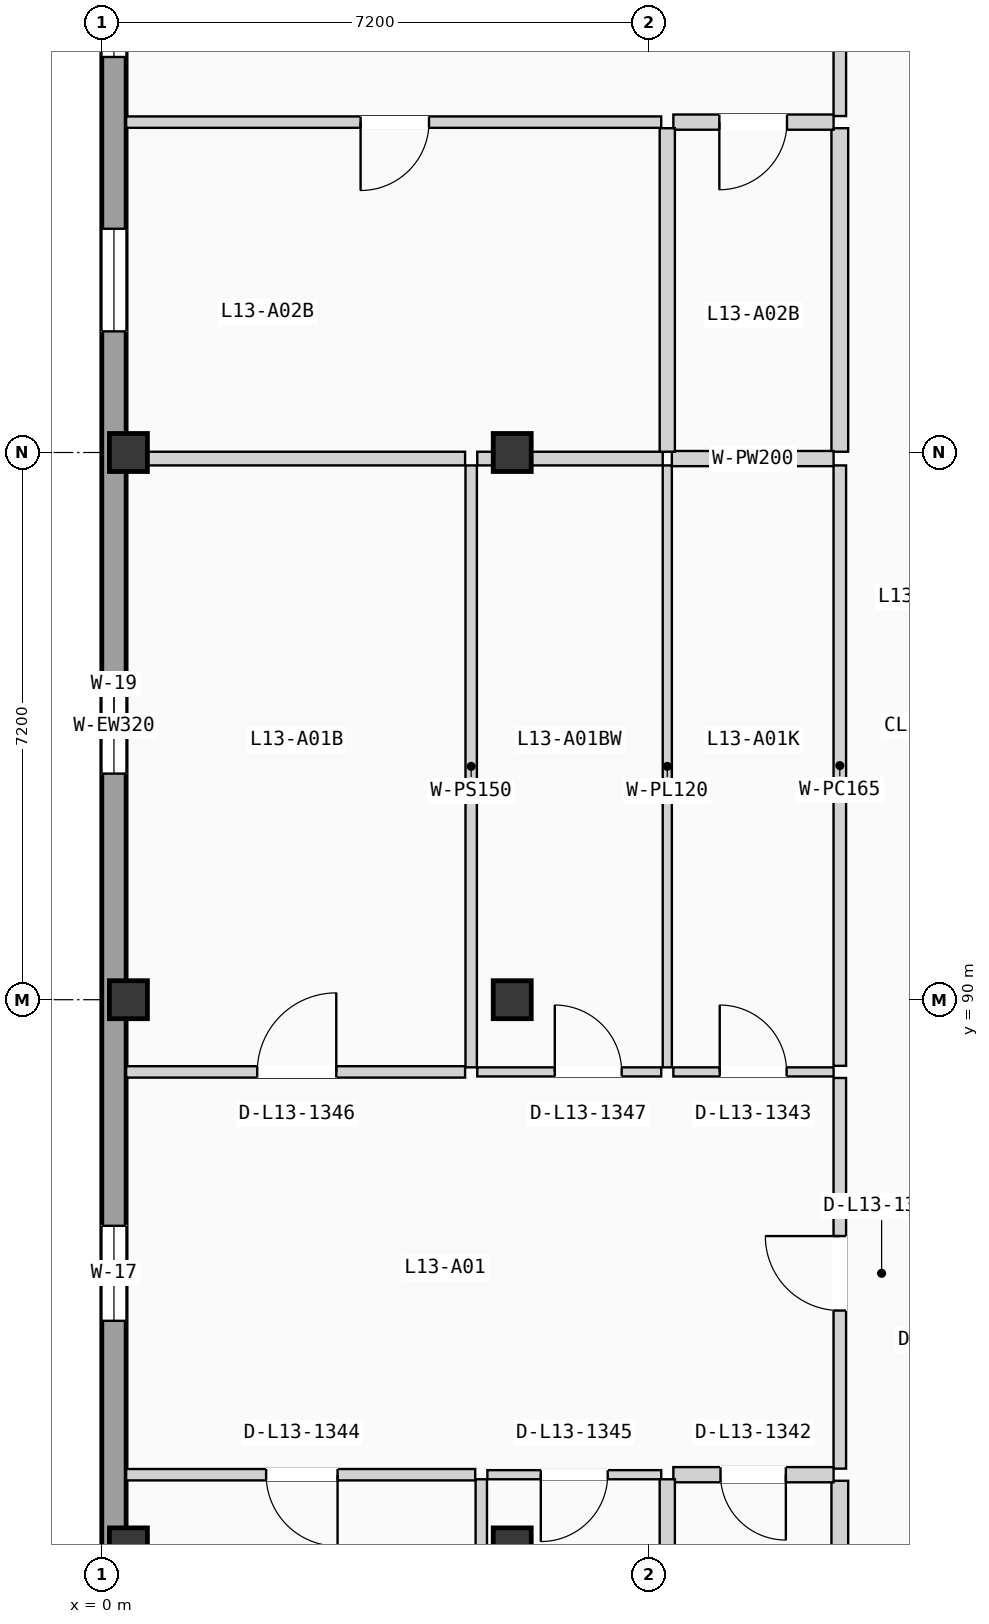
"""IFC4 building model, lengths in metres.
Left out: names, types, materials, properties, quantities, classifications, styles, units other than length and angle.
Written with IfcOpenShell. Run it as: python <this file> out.ifc"""

import sys

from ifc_helpers import new_model, si_unit, direction, frame, frame_2d, origin, origin_2d, place, context, subcontext, project, spatial, rectangle, extrude, element, fill, save


model = new_model("IFC4")
c1 = context("Model", 3, precision=1e-05, world=origin(), true_north=direction((0.0, 1.0)))
c2 = subcontext(c1, "Body", "Model", "MODEL_VIEW")
j1 = project(units=[si_unit("LENGTHUNIT", "METRE"), si_unit("PLANEANGLEUNIT", "RADIAN")], contexts=[c1])
p1 = place(None, origin())
s1 = spatial("IfcSite", under=j1, at=p1, CompositionType="ELEMENT")
p2 = place(p1, origin())
s2 = spatial("IfcBuilding", under=s1, at=p2, CompositionType="ELEMENT")
p3 = place(p2, frame((0.0, 0.0, 43.575)))
s3 = spatial("IfcBuildingStorey", under=s2, at=p3, CompositionType="ELEMENT", Elevation=43.575)
for number, where, z_axis, x_axis in (
    (1, (0.35, 82.8, 0.0), (0.0, 0.0, 1.0), (1.0, 0.0, 0.0)),
    (2, (0.35, 90.0, 0.0), (0.0, 0.0, 1.0), (1.0, 0.0, 0.0)),
    (3, (0.35, 97.2, 0.0), (0.0, 0.0, 1.0), (1.0, 0.0, 0.0)),
    (4, (5.4, 82.8, 0.0), (0.0, 0.0, 1.0), (1.0, 0.0, 0.0)),
    (5, (5.4, 90.0, 0.0), (0.0, 0.0, 1.0), (1.0, 0.0, 0.0)),
    (6, (5.4, 97.2, 0.0), (0.0, 0.0, 1.0), (1.0, 0.0, 0.0)),
):
    element("IfcColumn", number, at=place(p3, frame(where, z_axis=z_axis, x_axis=x_axis)), inside=s3, PredefinedType="COLUMN", context=c2, shape_type="SweptSolid", body=[
        extrude(rectangle(XDim=0.5, YDim=0.5, at=origin_2d()), origin(), (0.0, 0.0, 1.0), 3.15),
    ])
p4 = place(p3, frame((0.16, 68.72, 0.0), z_axis=(0.0, 0.0, 1.0), x_axis=(0.0, 1.0, 0.0)))
e7 = element("IfcWall", 7, at=p4, inside=s3, PredefinedType="SOLIDWALL", context=c2, shape_type="SweptSolid", body=[
    extrude(rectangle(XDim=49.76, YDim=0.32, at=frame_2d((24.88, 0.0))), origin(), (0.0, 0.0, 1.0), 2.6),
])
p5 = place(p4, frame((17.055, 0.0, 0.815)))
e8 = element("IfcOpeningElement", 8, at=p5, cuts=e7, PredefinedType="OPENING", context=c2, shape_type="SweptSolid", body=[
    extrude(rectangle(XDim=1.25, YDim=1.35, at=frame_2d((0.625, 0.675))), frame((0.0, 0.17, 0.0), z_axis=(0.0, -1.0, 0.0), x_axis=(1.0, 0.0, 0.0)), (0.0, 0.0, 1.0), 0.34),
])
p6 = place(p4, frame((9.92, 0.0, 0.665)))
e9 = element("IfcOpeningElement", 9, at=p6, cuts=e7, PredefinedType="OPENING", context=c2, shape_type="SweptSolid", body=[
    extrude(rectangle(XDim=1.25, YDim=1.5, at=frame_2d((0.625, 0.75))), frame((0.0, 0.17, 0.0), z_axis=(0.0, -1.0, 0.0), x_axis=(1.0, 0.0, 0.0)), (0.0, 0.0, 1.0), 0.34),
])
p7 = place(p4, frame((24.255, 0.0, 0.515)))
e10 = element("IfcOpeningElement", 10, at=p7, cuts=e7, PredefinedType="OPENING", context=c2, shape_type="SweptSolid", body=[
    extrude(rectangle(XDim=1.25, YDim=1.65, at=frame_2d((0.625, 0.825))), frame((0.0, 0.17, 0.0), z_axis=(0.0, -1.0, 0.0), x_axis=(1.0, 0.0, 0.0)), (0.0, 0.0, 1.0), 0.34),
])
p8 = place(p4, frame((33.684, 0.0, 0.85)))
e11 = element("IfcOpeningElement", 11, at=p8, cuts=e7, PredefinedType="OPENING", context=c2, shape_type="SweptSolid", body=[
    extrude(rectangle(XDim=0.95, YDim=1.2, at=frame_2d((0.475, 0.6))), frame((0.0, 0.17, 0.0), z_axis=(0.0, -1.0, 0.0), x_axis=(1.0, 0.0, 0.0)), (0.0, 0.0, 1.0), 0.34),
])
p9 = place(p4, frame((30.074, 0.0, 0.9)))
e12 = element("IfcOpeningElement", 12, at=p9, cuts=e7, PredefinedType="OPENING", context=c2, shape_type="SweptSolid", body=[
    extrude(rectangle(XDim=1.35, YDim=1.2, at=frame_2d((0.675, 0.6))), frame((0.0, 0.17, 0.0), z_axis=(0.0, -1.0, 0.0), x_axis=(1.0, 0.0, 0.0)), (0.0, 0.0, 1.0), 0.34),
])
p10 = place(p4, frame((39.677, 0.0, 0.815)))
e13 = element("IfcOpeningElement", 13, at=p10, cuts=e7, PredefinedType="OPENING", context=c2, shape_type="SweptSolid", body=[
    extrude(rectangle(XDim=1.35, YDim=1.35, at=frame_2d((0.675, 0.675))), frame((0.0, 0.17, 0.0), z_axis=(0.0, -1.0, 0.0), x_axis=(1.0, 0.0, 0.0)), (0.0, 0.0, 1.0), 0.34),
])
p11 = place(p3, frame((9.71, 83.83, 0.0), z_axis=(0.0, 0.0, 1.0), x_axis=(0.0, 1.0, 0.0)))
e14 = element("IfcWall", 14, at=p11, inside=s3, PredefinedType="PARTITIONING", context=c2, shape_type="SweptSolid", body=[
    extrude(rectangle(XDim=5.14, YDim=0.165, at=frame_2d((2.57, 0.0))), origin(), (0.0, 0.0, 1.0), 2.87),
])
p12 = place(p11, frame((2.08, 0.0, 0.0)))
e15 = element("IfcOpeningElement", 15, at=p12, cuts=e14, PredefinedType="OPENING", context=c2, shape_type="SweptSolid", body=[
    extrude(rectangle(XDim=0.98, YDim=2.08, at=frame_2d((0.49, 1.04))), frame((0.0, 0.093, 0.0), z_axis=(0.0, -1.0, 0.0), x_axis=(1.0, 0.0, 0.0)), (0.0, 0.0, 1.0), 0.185),
])
p13 = place(p3, frame((9.71, 76.0, 0.0), z_axis=(0.0, 0.0, 1.0), x_axis=(0.0, 1.0, 0.0)))
e16 = element("IfcWall", 16, at=p13, inside=s3, PredefinedType="PLUMBINGWALL", context=c2, shape_type="SweptSolid", body=[
    extrude(rectangle(XDim=7.67, YDim=0.22, at=frame_2d((3.835, 0.0))), origin(), (0.0, 0.0, 1.0), 2.87),
])
p14 = place(p3, frame((9.71, 89.13, 0.0), z_axis=(0.0, 0.0, 1.0), x_axis=(0.0, 1.0, 0.0)))
e17 = element("IfcWall", 17, at=p14, inside=s3, PredefinedType="PARTITIONING", context=c2, shape_type="SweptSolid", body=[
    extrude(rectangle(XDim=7.9, YDim=0.165, at=frame_2d((3.95, 0.0))), origin(), (0.0, 0.0, 1.0), 2.87),
])
p15 = place(p3, frame((9.71, 101.627, 0.0), z_axis=(0.0, 0.0, 1.0), x_axis=(0.0, 1.0, 0.0)))
e18 = element("IfcWall", 18, at=p15, inside=s3, PredefinedType="PARTITIONING", context=c2, shape_type="SweptSolid", body=[
    extrude(rectangle(XDim=5.156, YDim=0.165, at=frame_2d((2.578, 0.0))), origin(), (0.0, 0.0, 1.0), 2.87),
])
p16 = place(p15, frame((2.088, 0.0, 0.0)))
e19 = element("IfcOpeningElement", 19, at=p16, cuts=e18, PredefinedType="OPENING", context=c2, shape_type="SweptSolid", body=[
    extrude(rectangle(XDim=0.98, YDim=2.08, at=frame_2d((0.49, 1.04))), frame((0.0, 0.093, 0.0), z_axis=(0.0, -1.0, 0.0), x_axis=(1.0, 0.0, 0.0)), (0.0, 0.0, 1.0), 0.185),
])
p17 = place(p3, frame((9.71, 97.21, 0.0), z_axis=(0.0, 0.0, 1.0), x_axis=(0.0, 1.0, 0.0)))
e20 = element("IfcWall", 20, at=p17, inside=s3, PredefinedType="PLUMBINGWALL", context=c2, shape_type="SweptSolid", body=[
    extrude(rectangle(XDim=4.257, YDim=0.22, at=frame_2d((2.128, 0.0))), origin(), (0.0, 0.0, 1.0), 2.87),
])
p18 = place(p3, frame((7.52, 83.75, 0.0), z_axis=(0.0, 0.0, 1.0), x_axis=(1.0, 0.0, 0.0)))
e21 = element("IfcWall", 21, at=p18, inside=s3, PredefinedType="PLUMBINGWALL", context=c2, shape_type="SweptSolid", body=[
    extrude(rectangle(XDim=2.108, YDim=0.2, at=frame_2d((1.054, 0.0))), origin(), (0.0, 0.0, 1.0), 2.87),
])
p19 = place(p18, frame((0.62, 0.0, 0.0)))
e22 = element("IfcOpeningElement", 22, at=p19, cuts=e21, PredefinedType="OPENING", context=c2, shape_type="SweptSolid", body=[
    extrude(rectangle(XDim=0.86, YDim=2.0, at=frame_2d((0.43, 1.0))), frame((0.0, 0.11, 0.0), z_axis=(0.0, -1.0, 0.0), x_axis=(1.0, 0.0, 0.0)), (0.0, 0.0, 1.0), 0.22),
])
p20 = place(p3, frame((7.52, 89.05, 0.0), z_axis=(0.0, 0.0, 1.0), x_axis=(1.0, 0.0, 0.0)))
e23 = element("IfcWall", 23, at=p20, inside=s3, PredefinedType="PARTITIONING", context=c2, shape_type="SweptSolid", body=[
    extrude(rectangle(XDim=2.108, YDim=0.12, at=frame_2d((1.054, 0.0))), origin(), (0.0, 0.0, 1.0), 2.87),
])
p21 = place(p20, frame((0.61, 0.0, 0.0)))
e24 = element("IfcOpeningElement", 24, at=p21, cuts=e23, PredefinedType="OPENING", context=c2, shape_type="SweptSolid", body=[
    extrude(rectangle(XDim=0.88, YDim=2.02, at=frame_2d((0.44, 1.01))), frame((0.0, 0.07, 0.0), z_axis=(0.0, -1.0, 0.0), x_axis=(1.0, 0.0, 0.0)), (0.0, 0.0, 1.0), 0.14),
])
p22 = place(p3, frame((0.32, 83.75, 0.0), z_axis=(0.0, 0.0, 1.0), x_axis=(1.0, 0.0, 0.0)))
e25 = element("IfcWall", 25, at=p22, inside=s3, PredefinedType="PARTITIONING", context=c2, shape_type="SweptSolid", body=[
    extrude(rectangle(XDim=4.593, YDim=0.15, at=frame_2d((2.296, 0.0))), origin(), (0.0, 0.0, 1.0), 2.87),
])
p23 = place(p22, frame((1.842, 0.0, 0.0)))
e26 = element("IfcOpeningElement", 26, at=p23, cuts=e25, PredefinedType="OPENING", context=c2, shape_type="SweptSolid", body=[
    extrude(rectangle(XDim=0.94, YDim=2.06, at=frame_2d((0.47, 1.03))), frame((0.0, 0.085, 0.0), z_axis=(0.0, -1.0, 0.0), x_axis=(1.0, 0.0, 0.0)), (0.0, 0.0, 1.0), 0.17),
])
p24 = place(p3, frame((5.073, 83.75, 0.0), z_axis=(0.0, 0.0, 1.0), x_axis=(1.0, 0.0, 0.0)))
e27 = element("IfcWall", 27, at=p24, inside=s3, PredefinedType="PARTITIONING", context=c2, shape_type="SweptSolid", body=[
    extrude(rectangle(XDim=2.287, YDim=0.12, at=frame_2d((1.144, 0.0))), origin(), (0.0, 0.0, 1.0), 2.87),
])
p25 = place(p24, frame((0.703, 0.0, 0.0)))
e28 = element("IfcOpeningElement", 28, at=p25, cuts=e27, PredefinedType="OPENING", context=c2, shape_type="SweptSolid", body=[
    extrude(rectangle(XDim=0.88, YDim=2.02, at=frame_2d((0.44, 1.01))), frame((0.0, 0.07, 0.0), z_axis=(0.0, -1.0, 0.0), x_axis=(1.0, 0.0, 0.0)), (0.0, 0.0, 1.0), 0.14),
])
p26 = place(p3, frame((0.32, 89.05, 0.0), z_axis=(0.0, 0.0, 1.0), x_axis=(1.0, 0.0, 0.0)))
e29 = element("IfcWall", 29, at=p26, inside=s3, PredefinedType="PARTITIONING", context=c2, shape_type="SweptSolid", body=[
    extrude(rectangle(XDim=4.46, YDim=0.15, at=frame_2d((2.23, 0.0))), origin(), (0.0, 0.0, 1.0), 2.87),
])
p27 = place(p26, frame((1.725, 0.0, 0.0)))
e30 = element("IfcOpeningElement", 30, at=p27, cuts=e29, PredefinedType="OPENING", context=c2, shape_type="SweptSolid", body=[
    extrude(rectangle(XDim=1.04, YDim=2.08, at=frame_2d((0.52, 1.04))), frame((0.0, 0.085, 0.0), z_axis=(0.0, -1.0, 0.0), x_axis=(1.0, 0.0, 0.0)), (0.0, 0.0, 1.0), 0.17),
])
p28 = place(p3, frame((4.94, 89.05, 0.0), z_axis=(0.0, 0.0, 1.0), x_axis=(1.0, 0.0, 0.0)))
e31 = element("IfcWall", 31, at=p28, inside=s3, PredefinedType="PARTITIONING", context=c2, shape_type="SweptSolid", body=[
    extrude(rectangle(XDim=2.42, YDim=0.12, at=frame_2d((1.21, 0.0))), origin(), (0.0, 0.0, 1.0), 2.87),
])
p29 = place(p28, frame((1.02, 0.0, 0.0)))
e32 = element("IfcOpeningElement", 32, at=p29, cuts=e31, PredefinedType="OPENING", context=c2, shape_type="SweptSolid", body=[
    extrude(rectangle(XDim=0.88, YDim=2.02, at=frame_2d((0.44, 1.01))), frame((0.0, 0.07, 0.0), z_axis=(0.0, -1.0, 0.0), x_axis=(1.0, 0.0, 0.0)), (0.0, 0.0, 1.0), 0.14),
])
p30 = place(p3, frame((7.44, 76.0, 0.0), z_axis=(0.0, 0.0, 1.0), x_axis=(0.0, 1.0, 0.0)))
e33 = element("IfcWall", 33, at=p30, inside=s3, PredefinedType="PLUMBINGWALL", context=c2, shape_type="SweptSolid", body=[
    extrude(rectangle(XDim=7.69, YDim=0.2, at=frame_2d((3.845, 0.0))), origin(), (0.0, 0.0, 1.0), 2.87),
])
p31 = place(p30, frame((3.41, 0.0, 0.0)))
e34 = element("IfcOpeningElement", 34, at=p31, cuts=e33, PredefinedType="OPENING", context=c2, shape_type="SweptSolid", body=[
    extrude(rectangle(XDim=0.85, YDim=2.01, at=frame_2d((0.425, 1.005))), frame((0.0, 0.11, 0.0), z_axis=(0.0, -1.0, 0.0), x_axis=(1.0, 0.0, 0.0)), (0.0, 0.0, 1.0), 0.22),
])
p32 = place(p3, frame((7.44, 89.11, 0.0), z_axis=(0.0, 0.0, 1.0), x_axis=(0.0, 1.0, 0.0)))
e35 = element("IfcWall", 35, at=p32, inside=s3, PredefinedType="PARTITIONING", context=c2, shape_type="SweptSolid", body=[
    extrude(rectangle(XDim=7.92, YDim=0.12, at=frame_2d((3.96, 0.0))), origin(), (0.0, 0.0, 1.0), 2.87),
])
p33 = place(p3, frame((7.5, 97.12, 0.0), z_axis=(0.0, 0.0, 1.0), x_axis=(1.0, 0.0, 0.0)))
e36 = element("IfcWall", 36, at=p33, inside=s3, PredefinedType="PLUMBINGWALL", context=c2, shape_type="SweptSolid", body=[
    extrude(rectangle(XDim=2.128, YDim=0.2, at=frame_2d((1.064, 0.0))), origin(), (0.0, 0.0, 1.0), 2.17),
])
p34 = place(p3, frame((4.993, 76.0, 0.0), z_axis=(0.0, 0.0, 1.0), x_axis=(0.0, 1.0, 0.0)))
e37 = element("IfcWall", 37, at=p34, inside=s3, PredefinedType="PARTITIONING", context=c2, shape_type="SweptSolid", body=[
    extrude(rectangle(XDim=7.69, YDim=0.15, at=frame_2d((3.845, 0.0))), origin(), (0.0, 0.0, 1.0), 2.87),
])
p35 = place(p3, frame((4.86, 89.11, 0.0), z_axis=(0.0, 0.0, 1.0), x_axis=(0.0, 1.0, 0.0)))
e38 = element("IfcWall", 38, at=p35, inside=s3, PredefinedType="PARTITIONING", context=c2, shape_type="SweptSolid", body=[
    extrude(rectangle(XDim=7.92, YDim=0.15, at=frame_2d((3.96, 0.0))), origin(), (0.0, 0.0, 1.0), 2.87),
])
p36 = place(p3, frame((0.32, 97.12, 0.0), z_axis=(0.0, 0.0, 1.0), x_axis=(1.0, 0.0, 0.0)))
e39 = element("IfcWall", 39, at=p36, inside=s3, PredefinedType="PARTITIONING", context=c2, shape_type="SweptSolid", body=[
    extrude(rectangle(XDim=4.46, YDim=0.18, at=frame_2d((2.23, 0.0))), origin(), (0.0, 0.0, 1.0), 2.22),
])
p37 = place(p3, frame((4.94, 97.12, 0.0), z_axis=(0.0, 0.0, 1.0), x_axis=(1.0, 0.0, 0.0)))
e40 = element("IfcWall", 40, at=p37, inside=s3, PredefinedType="PARTITIONING", context=c2, shape_type="SweptSolid", body=[
    extrude(rectangle(XDim=2.44, YDim=0.18, at=frame_2d((1.22, 0.0))), origin(), (0.0, 0.0, 1.0), 2.17),
])
p38 = place(p3, frame((7.52, 101.547, 0.0), z_axis=(0.0, 0.0, 1.0), x_axis=(1.0, 0.0, 0.0)))
e41 = element("IfcWall", 41, at=p38, inside=s3, PredefinedType="PLUMBINGWALL", context=c2, shape_type="SweptSolid", body=[
    extrude(rectangle(XDim=2.108, YDim=0.2, at=frame_2d((1.054, 0.0))), origin(), (0.0, 0.0, 1.0), 2.87),
])
p39 = place(p38, frame((0.605, 0.0, 0.0)))
e42 = element("IfcOpeningElement", 42, at=p39, cuts=e41, PredefinedType="OPENING", context=c2, shape_type="SweptSolid", body=[
    extrude(rectangle(XDim=0.89, YDim=2.03, at=frame_2d((0.445, 1.015))), frame((0.0, 0.11, 0.0), z_axis=(0.0, -1.0, 0.0), x_axis=(1.0, 0.0, 0.0)), (0.0, 0.0, 1.0), 0.22),
])
p40 = place(p3, frame((0.32, 101.547, 0.0), z_axis=(0.0, 0.0, 1.0), x_axis=(1.0, 0.0, 0.0)))
e43 = element("IfcWall", 43, at=p40, inside=s3, PredefinedType="PARTITIONING", context=c2, shape_type="SweptSolid", body=[
    extrude(rectangle(XDim=7.04, YDim=0.15, at=frame_2d((3.52, 0.0))), origin(), (0.0, 0.0, 1.0), 2.87),
])
p41 = place(p40, frame((3.085, 0.0, 0.0)))
e44 = element("IfcOpeningElement", 44, at=p41, cuts=e43, PredefinedType="OPENING", context=c2, shape_type="SweptSolid", body=[
    extrude(rectangle(XDim=0.9, YDim=2.04, at=frame_2d((0.45, 1.02))), frame((0.0, 0.085, 0.0), z_axis=(0.0, -1.0, 0.0), x_axis=(1.0, 0.0, 0.0)), (0.0, 0.0, 1.0), 0.17),
])
p42 = place(p3, frame((7.44, 97.21, 0.0), z_axis=(0.0, 0.0, 1.0), x_axis=(0.0, 1.0, 0.0)))
e45 = element("IfcWall", 45, at=p42, inside=s3, PredefinedType="PLUMBINGWALL", context=c2, shape_type="SweptSolid", body=[
    extrude(rectangle(XDim=4.257, YDim=0.2, at=frame_2d((2.128, 0.0))), origin(), (0.0, 0.0, 1.0), 2.87),
])
p43 = place(p5, origin())
e46 = element("IfcWindow", 46, at=p43, inside=s3, PartitioningType="SINGLE_PANEL", PredefinedType="WINDOW", context=c2, shape_type="SweptSolid", body=[
    extrude(rectangle(XDim=1.25, YDim=1.35, at=frame_2d((0.625, 0.675))), frame((0.0, 0.03, 0.0), z_axis=(0.0, -1.0, 0.0), x_axis=(1.0, 0.0, 0.0)), (0.0, 0.0, 1.0), 0.06),
])
fill(e8, e46)
p44 = place(p7, origin())
e47 = element("IfcWindow", 47, at=p44, inside=s3, PartitioningType="SINGLE_PANEL", PredefinedType="WINDOW", context=c2, shape_type="SweptSolid", body=[
    extrude(rectangle(XDim=1.25, YDim=1.65, at=frame_2d((0.625, 0.825))), frame((0.0, 0.03, 0.0), z_axis=(0.0, -1.0, 0.0), x_axis=(1.0, 0.0, 0.0)), (0.0, 0.0, 1.0), 0.06),
])
fill(e10, e47)
p45 = place(p8, origin())
e48 = element("IfcWindow", 48, at=p45, inside=s3, PartitioningType="SINGLE_PANEL", PredefinedType="WINDOW", context=c2, shape_type="SweptSolid", body=[
    extrude(rectangle(XDim=0.95, YDim=1.2, at=frame_2d((0.475, 0.6))), frame((0.0, 0.03, 0.0), z_axis=(0.0, -1.0, 0.0), x_axis=(1.0, 0.0, 0.0)), (0.0, 0.0, 1.0), 0.06),
])
fill(e11, e48)
p46 = place(p9, origin())
e49 = element("IfcWindow", 49, at=p46, inside=s3, PartitioningType="SINGLE_PANEL", PredefinedType="WINDOW", context=c2, shape_type="SweptSolid", body=[
    extrude(rectangle(XDim=1.35, YDim=1.2, at=frame_2d((0.675, 0.6))), frame((0.0, 0.03, 0.0), z_axis=(0.0, -1.0, 0.0), x_axis=(1.0, 0.0, 0.0)), (0.0, 0.0, 1.0), 0.06),
])
fill(e12, e49)
p47 = place(p12, origin())
e50 = element("IfcDoor", 50, at=p47, inside=s3, OperationType="SINGLE_SWING_RIGHT", PredefinedType="DOOR", context=c2, shape_type="SweptSolid", body=[
    extrude(rectangle(XDim=0.98, YDim=2.08, at=frame_2d((0.49, 1.04))), frame((0.0, 0.025, 0.0), z_axis=(0.0, -1.0, 0.0), x_axis=(1.0, 0.0, 0.0)), (0.0, 0.0, 1.0), 0.05),
])
fill(e15, e50)
p48 = place(p19, frame((0.86, 0.0, 0.0), z_axis=(0.0, 0.0, 1.0), x_axis=(-1.0, 0.0, 0.0)))
e51 = element("IfcDoor", 51, at=p48, inside=s3, OperationType="SINGLE_SWING_RIGHT", PredefinedType="DOOR", context=c2, shape_type="SweptSolid", body=[
    extrude(rectangle(XDim=0.86, YDim=2.0, at=frame_2d((0.43, 1.0))), frame((0.0, 0.025, 0.0), z_axis=(0.0, -1.0, 0.0), x_axis=(1.0, 0.0, 0.0)), (0.0, 0.0, 1.0), 0.05),
])
fill(e22, e51)
p49 = place(p21, origin())
e52 = element("IfcDoor", 52, at=p49, inside=s3, OperationType="SINGLE_SWING_LEFT", PredefinedType="DOOR", context=c2, shape_type="SweptSolid", body=[
    extrude(rectangle(XDim=0.88, YDim=2.02, at=frame_2d((0.44, 1.01))), frame((0.0, 0.025, 0.0), z_axis=(0.0, -1.0, 0.0), x_axis=(1.0, 0.0, 0.0)), (0.0, 0.0, 1.0), 0.05),
])
fill(e24, e52)
p50 = place(p23, frame((0.94, 0.0, 0.0), z_axis=(0.0, 0.0, 1.0), x_axis=(-1.0, 0.0, 0.0)))
e53 = element("IfcDoor", 53, at=p50, inside=s3, OperationType="SINGLE_SWING_RIGHT", PredefinedType="DOOR", context=c2, shape_type="SweptSolid", body=[
    extrude(rectangle(XDim=0.94, YDim=2.06, at=frame_2d((0.47, 1.03))), frame((0.0, 0.025, 0.0), z_axis=(0.0, -1.0, 0.0), x_axis=(1.0, 0.0, 0.0)), (0.0, 0.0, 1.0), 0.05),
])
fill(e26, e53)
p51 = place(p25, frame((0.88, 0.0, 0.0), z_axis=(0.0, 0.0, 1.0), x_axis=(-1.0, 0.0, 0.0)))
e54 = element("IfcDoor", 54, at=p51, inside=s3, OperationType="SINGLE_SWING_LEFT", PredefinedType="DOOR", context=c2, shape_type="SweptSolid", body=[
    extrude(rectangle(XDim=0.88, YDim=2.02, at=frame_2d((0.44, 1.01))), frame((0.0, 0.025, 0.0), z_axis=(0.0, -1.0, 0.0), x_axis=(1.0, 0.0, 0.0)), (0.0, 0.0, 1.0), 0.05),
])
fill(e28, e54)
p52 = place(p27, origin())
e55 = element("IfcDoor", 55, at=p52, inside=s3, OperationType="SINGLE_SWING_RIGHT", PredefinedType="DOOR", context=c2, shape_type="SweptSolid", body=[
    extrude(rectangle(XDim=1.04, YDim=2.08, at=frame_2d((0.52, 1.04))), frame((0.0, 0.025, 0.0), z_axis=(0.0, -1.0, 0.0), x_axis=(1.0, 0.0, 0.0)), (0.0, 0.0, 1.0), 0.05),
])
fill(e30, e55)
p53 = place(p29, origin())
e56 = element("IfcDoor", 56, at=p53, inside=s3, OperationType="SINGLE_SWING_LEFT", PredefinedType="DOOR", context=c2, shape_type="SweptSolid", body=[
    extrude(rectangle(XDim=0.88, YDim=2.02, at=frame_2d((0.44, 1.01))), frame((0.0, 0.025, 0.0), z_axis=(0.0, -1.0, 0.0), x_axis=(1.0, 0.0, 0.0)), (0.0, 0.0, 1.0), 0.05),
])
fill(e32, e56)
p54 = place(p39, frame((0.89, 0.0, 0.0), z_axis=(0.0, 0.0, 1.0), x_axis=(-1.0, 0.0, 0.0)))
e57 = element("IfcDoor", 57, at=p54, inside=s3, OperationType="SINGLE_SWING_LEFT", PredefinedType="DOOR", context=c2, shape_type="SweptSolid", body=[
    extrude(rectangle(XDim=0.89, YDim=2.03, at=frame_2d((0.445, 1.015))), frame((0.0, 0.025, 0.0), z_axis=(0.0, -1.0, 0.0), x_axis=(1.0, 0.0, 0.0)), (0.0, 0.0, 1.0), 0.05),
])
fill(e42, e57)
p55 = place(p41, frame((0.9, 0.0, 0.0), z_axis=(0.0, 0.0, 1.0), x_axis=(-1.0, 0.0, 0.0)))
e58 = element("IfcDoor", 58, at=p55, inside=s3, OperationType="SINGLE_SWING_LEFT", PredefinedType="DOOR", context=c2, shape_type="SweptSolid", body=[
    extrude(rectangle(XDim=0.9, YDim=2.04, at=frame_2d((0.45, 1.02))), frame((0.0, 0.025, 0.0), z_axis=(0.0, -1.0, 0.0), x_axis=(1.0, 0.0, 0.0)), (0.0, 0.0, 1.0), 0.05),
])
fill(e44, e58)
save(model, sys.argv[1])
